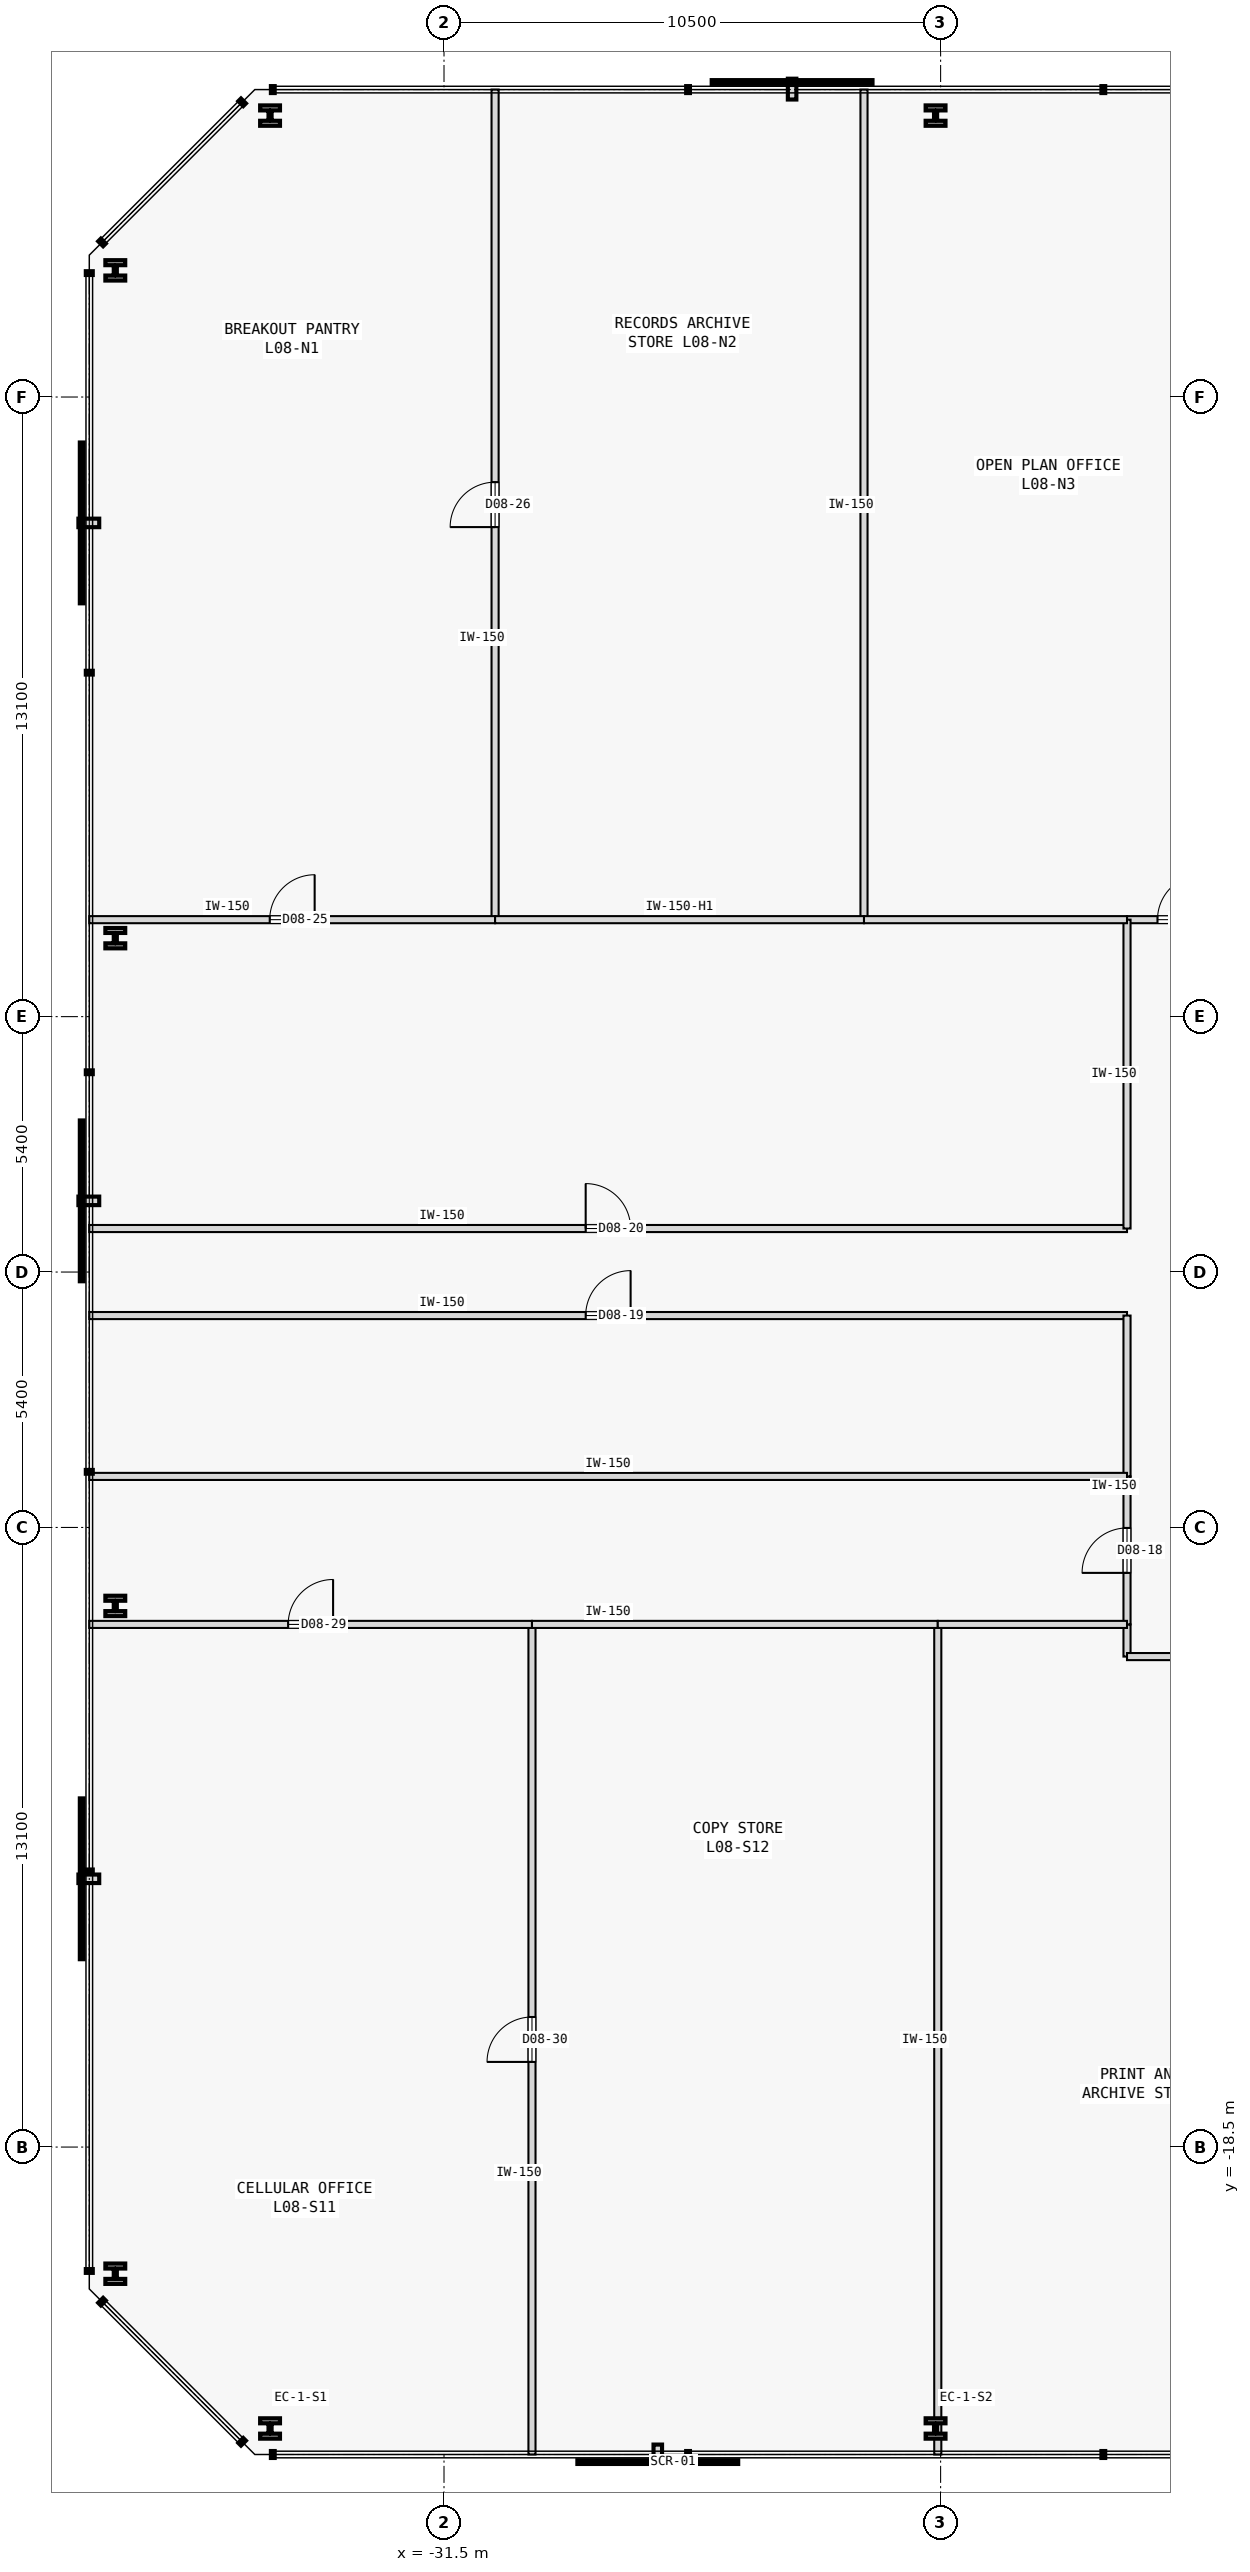
"""IFC4 building model, lengths in metres.
Left out: names, types, materials, properties, quantities, classifications, styles, units other than length and angle.
Written with IfcOpenShell. Run it as: python <this file> out.ifc"""

import sys

from ifc_helpers import new_model, si_unit, direction, frame, frame_2d, origin, origin_2d, place, context, subcontext, project, spatial, rectangle, i_section, extrude, element, fill, save


model = new_model("IFC4")
c1 = context("Model", 3, precision=1e-05, world=origin(), true_north=direction((0.0, 1.0)))
c2 = subcontext(c1, "Body", "Model", "MODEL_VIEW")
j1 = project(units=[si_unit("LENGTHUNIT", "METRE"), si_unit("PLANEANGLEUNIT", "RADIAN")], contexts=[c1])
p1 = place(None, origin())
s1 = spatial("IfcSite", under=j1, at=p1, CompositionType="ELEMENT")
p2 = place(p1, origin())
s2 = spatial("IfcBuilding", under=s1, at=p2, CompositionType="ELEMENT")
p3 = place(p2, frame((0.0, 0.0, 37.0)))
s3 = spatial("IfcBuildingStorey", under=s2, at=p3, CompositionType="ELEMENT", Elevation=37.0)
for number, where, z_axis, x_axis in (
    (1, (-35.178, -24.45, 0.0), (0.0, 0.0, 1.0), (1.0, 0.0, 0.0)),
    (2, (-21.107, -24.45, 0.0), (0.0, 0.0, 1.0), (1.0, 0.0, 0.0)),
    (3, (-21.107, 24.45, 0.0), (0.0, 0.0, 1.0), (1.0, 0.0, 0.0)),
    (4, (-35.178, 24.45, 0.0), (0.0, 0.0, 1.0), (1.0, 0.0, 0.0)),
    (5, (-38.45, 21.178, 0.0), (0.0, 0.0, 1.0), (1.0, 0.0, 0.0)),
    (6, (-38.45, 7.059, 0.0), (0.0, 0.0, 1.0), (1.0, 0.0, 0.0)),
    (7, (-38.45, -7.059, 0.0), (0.0, 0.0, 1.0), (1.0, 0.0, 0.0)),
    (8, (-38.45, -21.178, 0.0), (0.0, 0.0, 1.0), (1.0, 0.0, 0.0)),
):
    element("IfcColumn", number, at=place(p3, frame(where, z_axis=z_axis, x_axis=x_axis)), inside=s3, PredefinedType="COLUMN", context=c2, shape_type="SweptSolid", body=[
        extrude(i_section(OverallWidth=0.42, OverallDepth=0.431, WebThickness=0.065, FlangeThickness=0.106, FilletRadius=0.015, at=origin_2d()), origin(), (0.0, 0.0, 1.0), 3.8),
    ])
p4 = place(p3, frame((-17.059, 7.45, 0.0), z_axis=(0.0, 0.0, 1.0), x_axis=(1.0, 0.0, 0.0)))
e9 = element("IfcWall", 9, at=p4, inside=s3, PredefinedType="PARTITIONING", context=c2, shape_type="SweptSolid", body=[
    extrude(rectangle(XDim=2.239, YDim=0.15, at=frame_2d((1.12, 0.0))), origin(), (0.0, 0.0, 1.0), 3.575),
])
p5 = place(p4, frame((0.645, 0.0, 0.0)))
e10 = element("IfcOpeningElement", 10, at=p5, cuts=e9, PredefinedType="OPENING", context=c2, shape_type="SweptSolid", body=[
    extrude(rectangle(XDim=0.95, YDim=2.15, at=frame_2d((0.475, 1.075))), frame((0.0, 0.085, 0.0), z_axis=(0.0, -1.0, 0.0), x_axis=(1.0, 0.0, 0.0)), (0.0, 0.0, 1.0), 0.17),
])
p6 = place(p3, frame((-17.059, -8.13, 0.0), z_axis=(0.0, 0.0, 1.0), x_axis=(0.0, 1.0, 0.0)))
e11 = element("IfcWall", 11, at=p6, inside=s3, PredefinedType="PARTITIONING", context=c2, shape_type="SweptSolid", body=[
    extrude(rectangle(XDim=0.68, YDim=0.15, at=frame_2d((0.34, 0.0))), origin(), (0.0, 0.0, 1.0), 3.575),
])
p7 = place(p3, frame((-17.059, -8.13, 0.0), z_axis=(0.0, 0.0, 1.0), x_axis=(1.0, 0.0, 0.0)))
e12 = element("IfcWall", 12, at=p7, inside=s3, PredefinedType="PARTITIONING", context=c2, shape_type="SweptSolid", body=[
    extrude(rectangle(XDim=4.579, YDim=0.15, at=frame_2d((2.29, 0.0))), origin(), (0.0, 0.0, 1.0), 3.575),
])
p8 = place(p7, frame((1.814, 0.0, 0.0)))
e13 = element("IfcOpeningElement", 13, at=p8, cuts=e12, PredefinedType="OPENING", context=c2, shape_type="SweptSolid", body=[
    extrude(rectangle(XDim=0.95, YDim=2.15, at=frame_2d((0.475, 1.075))), frame((0.0, 0.085, 0.0), z_axis=(0.0, -1.0, 0.0), x_axis=(1.0, 0.0, 0.0)), (0.0, 0.0, 1.0), 0.17),
])
p9 = place(p3, frame((-17.059, -7.45, 0.0), z_axis=(0.0, 0.0, 1.0), x_axis=(0.0, 1.0, 0.0)))
e14 = element("IfcWall", 14, at=p9, inside=s3, PredefinedType="PARTITIONING", context=c2, shape_type="SweptSolid", body=[
    extrude(rectangle(XDim=3.129, YDim=0.15, at=frame_2d((1.564, 0.0))), origin(), (0.0, 0.0, 1.0), 3.575),
])
p10 = place(p9, frame((1.09, 0.0, 0.0)))
e15 = element("IfcOpeningElement", 15, at=p10, cuts=e14, PredefinedType="OPENING", context=c2, shape_type="SweptSolid", body=[
    extrude(rectangle(XDim=0.95, YDim=2.15, at=frame_2d((0.475, 1.075))), frame((0.0, 0.085, 0.0), z_axis=(0.0, -1.0, 0.0), x_axis=(1.0, 0.0, 0.0)), (0.0, 0.0, 1.0), 0.17),
])
p11 = place(p3, frame((-39.0, -0.92, 0.0), z_axis=(0.0, 0.0, 1.0), x_axis=(1.0, 0.0, 0.0)))
e16 = element("IfcWall", 16, at=p11, inside=s3, PredefinedType="PARTITIONING", context=c2, shape_type="SweptSolid", body=[
    extrude(rectangle(XDim=21.941, YDim=0.15, at=frame_2d((10.97, 0.0))), origin(), (0.0, 0.0, 1.0), 3.575),
])
p12 = place(p11, frame((10.496, 0.0, 0.0)))
e17 = element("IfcOpeningElement", 17, at=p12, cuts=e16, PredefinedType="OPENING", context=c2, shape_type="SweptSolid", body=[
    extrude(rectangle(XDim=0.95, YDim=2.15, at=frame_2d((0.475, 1.075))), frame((0.0, 0.085, 0.0), z_axis=(0.0, -1.0, 0.0), x_axis=(1.0, 0.0, 0.0)), (0.0, 0.0, 1.0), 0.17),
])
p13 = place(p3, frame((-17.059, -4.321, 0.0), z_axis=(0.0, 0.0, 1.0), x_axis=(0.0, 1.0, 0.0)))
e18 = element("IfcWall", 18, at=p13, inside=s3, PredefinedType="PARTITIONING", context=c2, shape_type="SweptSolid", body=[
    extrude(rectangle(XDim=3.401, YDim=0.15, at=frame_2d((1.701, 0.0))), origin(), (0.0, 0.0, 1.0), 3.575),
])
p14 = place(p3, frame((-39.0, 0.92, 0.0), z_axis=(0.0, 0.0, 1.0), x_axis=(1.0, 0.0, 0.0)))
e19 = element("IfcWall", 19, at=p14, inside=s3, PredefinedType="PARTITIONING", context=c2, shape_type="SweptSolid", body=[
    extrude(rectangle(XDim=21.941, YDim=0.15, at=frame_2d((10.97, 0.0))), origin(), (0.0, 0.0, 1.0), 3.575),
])
p15 = place(p14, frame((10.496, 0.0, 0.0)))
e20 = element("IfcOpeningElement", 20, at=p15, cuts=e19, PredefinedType="OPENING", context=c2, shape_type="SweptSolid", body=[
    extrude(rectangle(XDim=0.95, YDim=2.15, at=frame_2d((0.475, 1.075))), frame((0.0, 0.085, 0.0), z_axis=(0.0, -1.0, 0.0), x_axis=(1.0, 0.0, 0.0)), (0.0, 0.0, 1.0), 0.17),
])
p16 = place(p3, frame((-17.059, 0.92, 0.0), z_axis=(0.0, 0.0, 1.0), x_axis=(0.0, 1.0, 0.0)))
e21 = element("IfcWall", 21, at=p16, inside=s3, PredefinedType="PARTITIONING", context=c2, shape_type="SweptSolid", body=[
    extrude(rectangle(XDim=6.53, YDim=0.15, at=frame_2d((3.265, 0.0))), origin(), (0.0, 0.0, 1.0), 3.575),
])
p17 = place(p3, frame((-30.42, 7.45, 0.0), z_axis=(0.0, 0.0, 1.0), x_axis=(0.0, 1.0, 0.0)))
e22 = element("IfcWall", 22, at=p17, inside=s3, PredefinedType="PARTITIONING", context=c2, shape_type="SweptSolid", body=[
    extrude(rectangle(XDim=17.55, YDim=0.15, at=frame_2d((8.775, 0.0))), origin(), (0.0, 0.0, 1.0), 3.575),
])
p18 = place(p17, frame((8.3, 0.0, 0.0)))
e23 = element("IfcOpeningElement", 23, at=p18, cuts=e22, PredefinedType="OPENING", context=c2, shape_type="SweptSolid", body=[
    extrude(rectangle(XDim=0.95, YDim=2.15, at=frame_2d((0.475, 1.075))), frame((0.0, 0.085, 0.0), z_axis=(0.0, -1.0, 0.0), x_axis=(1.0, 0.0, 0.0)), (0.0, 0.0, 1.0), 0.17),
])
p19 = place(p3, frame((-39.0, 7.45, 0.0), z_axis=(0.0, 0.0, 1.0), x_axis=(1.0, 0.0, 0.0)))
e24 = element("IfcWall", 24, at=p19, inside=s3, PredefinedType="PARTITIONING", context=c2, shape_type="SweptSolid", body=[
    extrude(rectangle(XDim=8.58, YDim=0.15, at=frame_2d((4.29, 0.0))), origin(), (0.0, 0.0, 1.0), 3.575),
])
p20 = place(p19, frame((3.815, 0.0, 0.0)))
e25 = element("IfcOpeningElement", 25, at=p20, cuts=e24, PredefinedType="OPENING", context=c2, shape_type="SweptSolid", body=[
    extrude(rectangle(XDim=0.95, YDim=2.15, at=frame_2d((0.475, 1.075))), frame((0.0, 0.085, 0.0), z_axis=(0.0, -1.0, 0.0), x_axis=(1.0, 0.0, 0.0)), (0.0, 0.0, 1.0), 0.17),
])
p21 = place(p3, frame((-22.62, 7.45, 0.0), z_axis=(0.0, 0.0, 1.0), x_axis=(0.0, 1.0, 0.0)))
e26 = element("IfcWall", 26, at=p21, inside=s3, PredefinedType="PARTITIONING", context=c2, shape_type="SweptSolid", body=[
    extrude(rectangle(XDim=17.55, YDim=0.15, at=frame_2d((8.775, 0.0))), origin(), (0.0, 0.0, 1.0), 3.575),
])
p22 = place(p3, frame((-30.42, 7.45, 0.0), z_axis=(0.0, 0.0, 1.0), x_axis=(1.0, 0.0, 0.0)))
e27 = element("IfcWall", 27, at=p22, inside=s3, PredefinedType="PARTITIONING", context=c2, shape_type="SweptSolid", body=[
    extrude(rectangle(XDim=7.8, YDim=0.15, at=frame_2d((3.9, 0.0))), origin(), (0.0, 0.0, 1.0), 3.125),
])
p23 = place(p3, frame((-22.62, 7.45, 0.0), z_axis=(0.0, 0.0, 1.0), x_axis=(1.0, 0.0, 0.0)))
e28 = element("IfcWall", 28, at=p23, inside=s3, PredefinedType="PARTITIONING", context=c2, shape_type="SweptSolid", body=[
    extrude(rectangle(XDim=5.561, YDim=0.15, at=frame_2d((2.781, 0.0))), origin(), (0.0, 0.0, 1.0), 3.575),
])
p24 = place(p3, frame((-29.64, -25.0, 0.0), z_axis=(0.0, 0.0, 1.0), x_axis=(0.0, 1.0, 0.0)))
e29 = element("IfcWall", 29, at=p24, inside=s3, PredefinedType="PARTITIONING", context=c2, shape_type="SweptSolid", body=[
    extrude(rectangle(XDim=17.55, YDim=0.15, at=frame_2d((8.775, 0.0))), origin(), (0.0, 0.0, 1.0), 3.575),
])
p25 = place(p24, frame((8.3, 0.0, 0.0)))
e30 = element("IfcOpeningElement", 30, at=p25, cuts=e29, PredefinedType="OPENING", context=c2, shape_type="SweptSolid", body=[
    extrude(rectangle(XDim=0.95, YDim=2.15, at=frame_2d((0.475, 1.075))), frame((0.0, 0.085, 0.0), z_axis=(0.0, -1.0, 0.0), x_axis=(1.0, 0.0, 0.0)), (0.0, 0.0, 1.0), 0.17),
])
p26 = place(p3, frame((-39.0, -7.45, 0.0), z_axis=(0.0, 0.0, 1.0), x_axis=(1.0, 0.0, 0.0)))
e31 = element("IfcWall", 31, at=p26, inside=s3, PredefinedType="PARTITIONING", context=c2, shape_type="SweptSolid", body=[
    extrude(rectangle(XDim=9.36, YDim=0.15, at=frame_2d((4.68, 0.0))), origin(), (0.0, 0.0, 1.0), 3.575),
])
p27 = place(p26, frame((4.205, 0.0, 0.0)))
e32 = element("IfcOpeningElement", 32, at=p27, cuts=e31, PredefinedType="OPENING", context=c2, shape_type="SweptSolid", body=[
    extrude(rectangle(XDim=0.95, YDim=2.15, at=frame_2d((0.475, 1.075))), frame((0.0, 0.085, 0.0), z_axis=(0.0, -1.0, 0.0), x_axis=(1.0, 0.0, 0.0)), (0.0, 0.0, 1.0), 0.17),
])
p28 = place(p3, frame((-21.06, -25.0, 0.0), z_axis=(0.0, 0.0, 1.0), x_axis=(0.0, 1.0, 0.0)))
e33 = element("IfcWall", 33, at=p28, inside=s3, PredefinedType="PARTITIONING", context=c2, shape_type="SweptSolid", body=[
    extrude(rectangle(XDim=17.55, YDim=0.15, at=frame_2d((8.775, 0.0))), origin(), (0.0, 0.0, 1.0), 3.575),
])
p29 = place(p3, frame((-29.64, -7.45, 0.0), z_axis=(0.0, 0.0, 1.0), x_axis=(1.0, 0.0, 0.0)))
e34 = element("IfcWall", 34, at=p29, inside=s3, PredefinedType="PARTITIONING", context=c2, shape_type="SweptSolid", body=[
    extrude(rectangle(XDim=8.58, YDim=0.15, at=frame_2d((4.29, 0.0))), origin(), (0.0, 0.0, 1.0), 3.575),
])
p30 = place(p3, frame((-21.06, -7.45, 0.0), z_axis=(0.0, 0.0, 1.0), x_axis=(1.0, 0.0, 0.0)))
e35 = element("IfcWall", 35, at=p30, inside=s3, PredefinedType="PARTITIONING", context=c2, shape_type="SweptSolid", body=[
    extrude(rectangle(XDim=4.001, YDim=0.15, at=frame_2d((2.0, 0.0))), origin(), (0.0, 0.0, 1.0), 3.575),
])
p31 = place(p3, frame((-39.0, -4.321, 0.0), z_axis=(0.0, 0.0, 1.0), x_axis=(1.0, 0.0, 0.0)))
e36 = element("IfcWall", 36, at=p31, inside=s3, PredefinedType="PARTITIONING", context=c2, shape_type="SweptSolid", body=[
    extrude(rectangle(XDim=21.941, YDim=0.15, at=frame_2d((10.97, 0.0))), origin(), (0.0, 0.0, 1.0), 3.575),
])
p32 = place(p5, origin())
e37 = element("IfcDoor", 37, at=p32, inside=s3, OperationType="SINGLE_SWING_RIGHT", PredefinedType="DOOR", context=c2, shape_type="SweptSolid", body=[
    extrude(rectangle(XDim=0.95, YDim=2.15, at=frame_2d((0.475, 1.075))), frame((0.0, 0.025, 0.0), z_axis=(0.0, -1.0, 0.0), x_axis=(1.0, 0.0, 0.0)), (0.0, 0.0, 1.0), 0.05),
])
fill(e10, e37)
p33 = place(p10, origin())
e38 = element("IfcDoor", 38, at=p33, inside=s3, OperationType="SINGLE_SWING_LEFT", PredefinedType="DOOR", context=c2, shape_type="SweptSolid", body=[
    extrude(rectangle(XDim=0.95, YDim=2.15, at=frame_2d((0.475, 1.075))), frame((0.0, 0.025, 0.0), z_axis=(0.0, -1.0, 0.0), x_axis=(1.0, 0.0, 0.0)), (0.0, 0.0, 1.0), 0.05),
])
fill(e15, e38)
p34 = place(p12, origin())
e39 = element("IfcDoor", 39, at=p34, inside=s3, OperationType="SINGLE_SWING_RIGHT", PredefinedType="DOOR", context=c2, shape_type="SweptSolid", body=[
    extrude(rectangle(XDim=0.95, YDim=2.15, at=frame_2d((0.475, 1.075))), frame((0.0, 0.025, 0.0), z_axis=(0.0, -1.0, 0.0), x_axis=(1.0, 0.0, 0.0)), (0.0, 0.0, 1.0), 0.05),
])
fill(e17, e39)
p35 = place(p15, origin())
e40 = element("IfcDoor", 40, at=p35, inside=s3, OperationType="SINGLE_SWING_LEFT", PredefinedType="DOOR", context=c2, shape_type="SweptSolid", body=[
    extrude(rectangle(XDim=0.95, YDim=2.15, at=frame_2d((0.475, 1.075))), frame((0.0, 0.025, 0.0), z_axis=(0.0, -1.0, 0.0), x_axis=(1.0, 0.0, 0.0)), (0.0, 0.0, 1.0), 0.05),
])
fill(e20, e40)
p36 = place(p20, origin())
e41 = element("IfcDoor", 41, at=p36, inside=s3, OperationType="SINGLE_SWING_RIGHT", PredefinedType="DOOR", context=c2, shape_type="SweptSolid", body=[
    extrude(rectangle(XDim=0.95, YDim=2.15, at=frame_2d((0.475, 1.075))), frame((0.0, 0.025, 0.0), z_axis=(0.0, -1.0, 0.0), x_axis=(1.0, 0.0, 0.0)), (0.0, 0.0, 1.0), 0.05),
])
fill(e25, e41)
p37 = place(p18, origin())
e42 = element("IfcDoor", 42, at=p37, inside=s3, OperationType="SINGLE_SWING_LEFT", PredefinedType="DOOR", context=c2, shape_type="SweptSolid", body=[
    extrude(rectangle(XDim=0.95, YDim=2.15, at=frame_2d((0.475, 1.075))), frame((0.0, 0.025, 0.0), z_axis=(0.0, -1.0, 0.0), x_axis=(1.0, 0.0, 0.0)), (0.0, 0.0, 1.0), 0.05),
])
fill(e23, e42)
p38 = place(p27, origin())
e43 = element("IfcDoor", 43, at=p38, inside=s3, OperationType="SINGLE_SWING_RIGHT", PredefinedType="DOOR", context=c2, shape_type="SweptSolid", body=[
    extrude(rectangle(XDim=0.95, YDim=2.15, at=frame_2d((0.475, 1.075))), frame((0.0, 0.025, 0.0), z_axis=(0.0, -1.0, 0.0), x_axis=(1.0, 0.0, 0.0)), (0.0, 0.0, 1.0), 0.05),
])
fill(e32, e43)
p39 = place(p25, origin())
e44 = element("IfcDoor", 44, at=p39, inside=s3, OperationType="SINGLE_SWING_LEFT", PredefinedType="DOOR", context=c2, shape_type="SweptSolid", body=[
    extrude(rectangle(XDim=0.95, YDim=2.15, at=frame_2d((0.475, 1.075))), frame((0.0, 0.025, 0.0), z_axis=(0.0, -1.0, 0.0), x_axis=(1.0, 0.0, 0.0)), (0.0, 0.0, 1.0), 0.05),
])
fill(e30, e44)
save(model, sys.argv[1])
